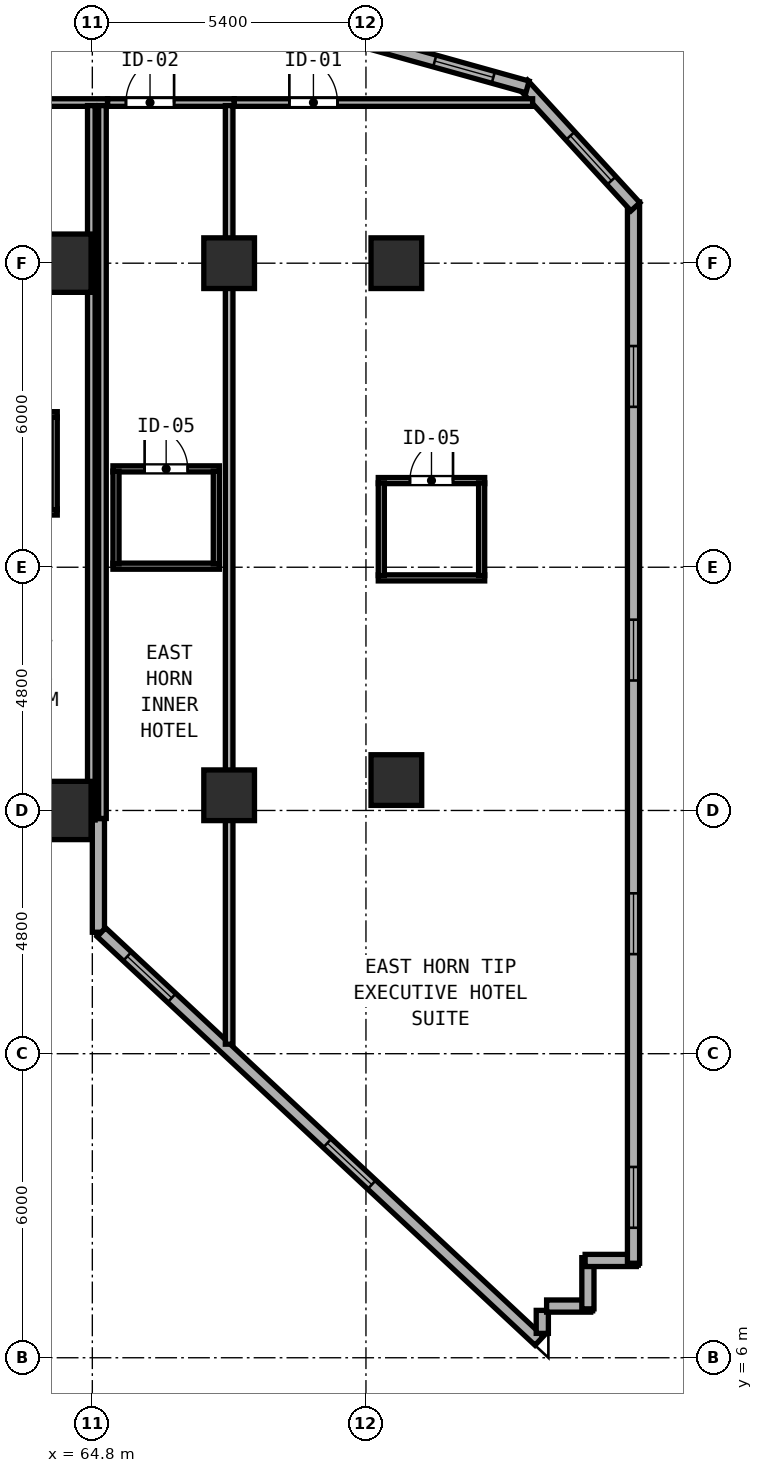
"""IFC4 building model, lengths in metres.
Left out: names, types, materials, properties, quantities, classifications, styles, units other than length and angle.
Written with IfcOpenShell. Run it as: python <this file> out.ifc"""

import sys

from ifc_helpers import new_model, si_unit, direction, frame, frame_2d, origin, origin_2d, place, context, subcontext, project, spatial, rectangle, hollow_rectangle, extrude, element, fill, save


model = new_model("IFC4")
c1 = context("Model", 3, precision=1e-05, world=origin(), true_north=direction((0.0, 1.0)))
c2 = subcontext(c1, "Body", "Model", "MODEL_VIEW")
j1 = project(units=[si_unit("LENGTHUNIT", "METRE"), si_unit("PLANEANGLEUNIT", "RADIAN")], contexts=[c1])
p1 = place(None, origin())
s1 = spatial("IfcSite", under=j1, at=p1, CompositionType="ELEMENT")
p2 = place(p1, origin())
s2 = spatial("IfcBuilding", under=s1, at=p2, CompositionType="ELEMENT")
p3 = place(p2, frame((0.0, 0.0, 81.8)))
s3 = spatial("IfcBuildingStorey", under=s2, at=p3, CompositionType="ELEMENT", Elevation=81.8)
for number, where, z_axis, x_axis in (
    (1, (64.2, 16.8, 0.0), (0.0, 0.0, 1.0), (1.0, 0.0, 0.0)),
    (2, (64.2, 27.6, 0.0), (0.0, 0.0, 1.0), (1.0, 0.0, 0.0)),
):
    element("IfcColumn", number, at=place(p3, frame(where, z_axis=z_axis, x_axis=x_axis)), inside=s3, PredefinedType="COLUMN", context=c2, shape_type="SweptSolid", body=[
        extrude(hollow_rectangle(XDim=1.15, YDim=1.15, WallThickness=0.042, at=origin_2d()), origin(), (0.0, 0.0, 1.0), 3.8),
    ])
for number, where, z_axis, x_axis in (
    (3, (70.8, 17.4, 0.0), (0.0, 0.0, 1.0), (1.0, 0.0, 0.0)),
    (4, (70.8, 27.6, 0.0), (0.0, 0.0, 1.0), (1.0, 0.0, 0.0)),
    (5, (67.5, 17.1, 0.0), (0.0, 0.0, 1.0), (1.0, 0.0, 0.0)),
    (6, (67.5, 27.6, 0.0), (0.0, 0.0, 1.0), (1.0, 0.0, 0.0)),
):
    element("IfcColumn", number, at=place(p3, frame(where, z_axis=z_axis, x_axis=x_axis)), inside=s3, PredefinedType="COLUMN", context=c2, shape_type="SweptSolid", body=[
        extrude(hollow_rectangle(XDim=1.0, YDim=1.0, WallThickness=0.038, at=origin_2d()), origin(), (0.0, 0.0, 1.0), 3.8),
    ])
p4 = place(p3, frame((64.92, 16.64, 0.0), z_axis=(0.0, 0.0, 1.0), x_axis=(0.0, -1.0, 0.0)))
e7 = element("IfcWall", 7, at=p4, inside=s3, PredefinedType="SOLIDWALL", context=c2, shape_type="SweptSolid", body=[
    extrude(rectangle(XDim=2.243, YDim=0.24, at=frame_2d((1.121, 0.0))), origin(), (0.0, 0.0, 1.0), 3.6),
])
p5 = place(p3, frame((64.979, 14.397, 0.0), z_axis=(0.0, 0.0, 1.0), x_axis=(0.731053894258, -0.682319722484, 0.0)))
e8 = element("IfcWall", 8, at=p5, inside=s3, PredefinedType="SOLIDWALL", context=c2, shape_type="SweptSolid", body=[
    extrude(rectangle(XDim=11.818, YDim=0.24, at=frame_2d((5.909, 0.0))), origin(), (0.0, 0.0, 1.0), 3.6),
])
p6 = place(p5, frame((0.7, 0.0, 0.85)))
e9 = element("IfcOpeningElement", 9, at=p6, cuts=e8, PredefinedType="OPENING", context=c2, shape_type="SweptSolid", body=[
    extrude(rectangle(XDim=1.2, YDim=1.85, at=frame_2d((0.6, 0.925))), frame((0.0, 0.13, 0.0), z_axis=(0.0, -1.0, 0.0), x_axis=(1.0, 0.0, 0.0)), (0.0, 0.0, 1.0), 0.26),
])
p7 = place(p5, frame((6.1, 0.0, 0.85)))
e10 = element("IfcOpeningElement", 10, at=p7, cuts=e8, PredefinedType="OPENING", context=c2, shape_type="SweptSolid", body=[
    extrude(rectangle(XDim=1.2, YDim=1.85, at=frame_2d((0.6, 0.925))), frame((0.0, 0.13, 0.0), z_axis=(0.0, -1.0, 0.0), x_axis=(1.0, 0.0, 0.0)), (0.0, 0.0, 1.0), 0.26),
])
p8 = place(p3, frame((73.68, 6.481, 0.0), z_axis=(0.0, 0.0, 1.0), x_axis=(0.0, 1.0, 0.0)))
e11 = element("IfcWall", 11, at=p8, inside=s3, PredefinedType="SOLIDWALL", context=c2, shape_type="SweptSolid", body=[
    extrude(rectangle(XDim=0.454, YDim=0.24, at=frame_2d((0.227, 0.0))), origin(), (0.0, 0.0, 1.0), 3.6),
])
p9 = place(p3, frame((73.765, 7.02, 0.0), z_axis=(0.0, 0.0, 1.0), x_axis=(1.0, 0.0, 0.0)))
e12 = element("IfcWall", 12, at=p9, inside=s3, PredefinedType="SOLIDWALL", context=c2, shape_type="SweptSolid", body=[
    extrude(rectangle(XDim=0.87, YDim=0.24, at=frame_2d((0.435, 0.0))), origin(), (0.0, 0.0, 1.0), 3.6),
])
for number, where, z_axis, x_axis in (
    (13, (74.58, 6.965, 0.0), (0.0, 0.0, 1.0), (0.0, 1.0, 0.0)),
    (14, (74.525, 7.92, 0.0), (0.0, 0.0, 1.0), (1.0, 0.0, 0.0)),
):
    element("IfcWall", number, at=place(p3, frame(where, z_axis=z_axis, x_axis=x_axis)), inside=s3, PredefinedType="SOLIDWALL", context=c2, shape_type="SweptSolid", body=[
        extrude(rectangle(XDim=1.01, YDim=0.24, at=frame_2d((0.505, 0.0))), origin(), (0.0, 0.0, 1.0), 3.6),
    ])
p10 = place(p3, frame((75.48, 7.865, 0.0), z_axis=(0.0, 0.0, 1.0), x_axis=(0.0, 1.0, 0.0)))
e15 = element("IfcWall", 15, at=p10, inside=s3, PredefinedType="SOLIDWALL", context=c2, shape_type="SweptSolid", body=[
    extrude(rectangle(XDim=20.943, YDim=0.24, at=frame_2d((10.472, 0.0))), origin(), (0.0, 0.0, 1.0), 3.6),
])
p11 = place(p10, frame((0.7, 0.0, 0.85)))
e16 = element("IfcOpeningElement", 16, at=p11, cuts=e15, PredefinedType="OPENING", context=c2, shape_type="SweptSolid", body=[
    extrude(rectangle(XDim=1.2, YDim=1.85, at=frame_2d((0.6, 0.925))), frame((0.0, 0.13, 0.0), z_axis=(0.0, -1.0, 0.0), x_axis=(1.0, 0.0, 0.0)), (0.0, 0.0, 1.0), 0.26),
])
p12 = place(p10, frame((6.1, 0.0, 0.85)))
e17 = element("IfcOpeningElement", 17, at=p12, cuts=e15, PredefinedType="OPENING", context=c2, shape_type="SweptSolid", body=[
    extrude(rectangle(XDim=1.2, YDim=1.85, at=frame_2d((0.6, 0.925))), frame((0.0, 0.13, 0.0), z_axis=(0.0, -1.0, 0.0), x_axis=(1.0, 0.0, 0.0)), (0.0, 0.0, 1.0), 0.26),
])
p13 = place(p10, frame((11.5, 0.0, 0.85)))
e18 = element("IfcOpeningElement", 18, at=p13, cuts=e15, PredefinedType="OPENING", context=c2, shape_type="SweptSolid", body=[
    extrude(rectangle(XDim=1.2, YDim=1.85, at=frame_2d((0.6, 0.925))), frame((0.0, 0.13, 0.0), z_axis=(0.0, -1.0, 0.0), x_axis=(1.0, 0.0, 0.0)), (0.0, 0.0, 1.0), 0.26),
])
p14 = place(p10, frame((16.9, 0.0, 0.85)))
e19 = element("IfcOpeningElement", 19, at=p14, cuts=e15, PredefinedType="OPENING", context=c2, shape_type="SweptSolid", body=[
    extrude(rectangle(XDim=1.2, YDim=1.85, at=frame_2d((0.6, 0.925))), frame((0.0, 0.13, 0.0), z_axis=(0.0, -1.0, 0.0), x_axis=(1.0, 0.0, 0.0)), (0.0, 0.0, 1.0), 0.26),
])
p15 = place(p3, frame((75.517, 28.713, 0.0), z_axis=(0.0, 0.0, 1.0), x_axis=(-0.67574145796, 0.737138712858, 0.0)))
e20 = element("IfcWall", 20, at=p15, inside=s3, PredefinedType="SOLIDWALL", context=c2, shape_type="SweptSolid", body=[
    extrude(rectangle(XDim=3.284, YDim=0.24, at=frame_2d((1.642, 0.0))), origin(), (0.0, 0.0, 1.0), 3.6),
])
p16 = place(p15, frame((0.7, 0.0, 0.85)))
e21 = element("IfcOpeningElement", 21, at=p16, cuts=e20, PredefinedType="OPENING", context=c2, shape_type="SweptSolid", body=[
    extrude(rectangle(XDim=1.2, YDim=1.85, at=frame_2d((0.6, 0.925))), frame((0.0, 0.13, 0.0), z_axis=(0.0, -1.0, 0.0), x_axis=(1.0, 0.0, 0.0)), (0.0, 0.0, 1.0), 0.26),
])
p17 = place(p3, frame((73.388, 31.079, 0.0), z_axis=(0.0, 0.0, 1.0), x_axis=(-0.963197271032, 0.268795493036, 0.0)))
e22 = element("IfcWall", 22, at=p17, inside=s3, PredefinedType="SOLIDWALL", context=c2, shape_type="SweptSolid", body=[
    extrude(rectangle(XDim=9.095, YDim=0.24, at=frame_2d((4.548, 0.0))), origin(), (0.0, 0.0, 1.0), 3.6),
])
p18 = place(p17, frame((0.7, 0.0, 0.85)))
e23 = element("IfcOpeningElement", 23, at=p18, cuts=e22, PredefinedType="OPENING", context=c2, shape_type="SweptSolid", body=[
    extrude(rectangle(XDim=1.2, YDim=1.85, at=frame_2d((0.6, 0.925))), frame((0.0, 0.13, 0.0), z_axis=(0.0, -1.0, 0.0), x_axis=(1.0, 0.0, 0.0)), (0.0, 0.0, 1.0), 0.26),
])
p19 = place(p17, frame((6.1, 0.0, 0.85)))
e24 = element("IfcOpeningElement", 24, at=p19, cuts=e22, PredefinedType="OPENING", context=c2, shape_type="SweptSolid", body=[
    extrude(rectangle(XDim=1.2, YDim=1.85, at=frame_2d((0.6, 0.925))), frame((0.0, 0.13, 0.0), z_axis=(0.0, -1.0, 0.0), x_axis=(1.0, 0.0, 0.0)), (0.0, 0.0, 1.0), 0.26),
])
p20 = place(p3, frame((61.202, 30.77, 0.0), z_axis=(0.0, 0.0, 1.0), x_axis=(1.0, 0.0, 0.0)))
e25 = element("IfcWall", 25, at=p20, inside=s3, PredefinedType="PARTITIONING", context=c2, shape_type="SweptSolid", body=[
    extrude(rectangle(XDim=3.898, YDim=0.15, at=frame_2d((1.949, 0.0))), origin(), (0.0, 0.0, 1.0), 3.6),
])
p21 = place(p20, frame((1.09, 0.0, 0.0), z_axis=(0.0, 0.0, 1.0), x_axis=(-1.0, 0.0, 0.0)))
e26 = element("IfcOpeningElement", 26, at=p21, cuts=e25, PredefinedType="OPENING", context=c2, shape_type="SweptSolid", body=[
    extrude(rectangle(XDim=0.95, YDim=2.15, at=frame_2d((0.475, 1.075))), frame((0.0, 0.085, 0.0), z_axis=(0.0, -1.0, 0.0), x_axis=(1.0, 0.0, 0.0)), (0.0, 0.0, 1.0), 0.17),
])
p22 = place(p3, frame((65.0, 16.642, 0.0), z_axis=(0.0, 0.0, 1.0), x_axis=(0.0, 1.0, 0.0)))
e27 = element("IfcWall", 27, at=p22, inside=s3, PredefinedType="PARTITIONING", context=c2, shape_type="SweptSolid", body=[
    extrude(rectangle(XDim=14.068, YDim=0.15, at=frame_2d((7.034, 0.0))), origin(), (0.0, 0.0, 1.0), 3.6),
])
p23 = place(p3, frame((62.008, 24.61, 0.0), z_axis=(0.0, 0.0, 1.0), x_axis=(1.0, 0.0, 0.0)))
e28 = element("IfcWall", 28, at=p23, inside=s3, PredefinedType="PARTITIONING", context=c2, shape_type="SweptSolid", body=[
    extrude(rectangle(XDim=2.1, YDim=0.12, at=frame_2d((1.05, 0.0))), origin(), (0.0, 0.0, 1.0), 3.6),
])
p24 = place(p23, frame((1.475, 0.0, 0.0), z_axis=(0.0, 0.0, 1.0), x_axis=(-1.0, 0.0, 0.0)))
e29 = element("IfcOpeningElement", 29, at=p24, cuts=e28, PredefinedType="OPENING", context=c2, shape_type="SweptSolid", body=[
    extrude(rectangle(XDim=0.85, YDim=2.1, at=frame_2d((0.425, 1.05))), frame((0.0, 0.07, 0.0), z_axis=(0.0, -1.0, 0.0), x_axis=(1.0, 0.0, 0.0)), (0.0, 0.0, 1.0), 0.14),
])
p25 = place(p3, frame((62.008, 22.69, 0.0), z_axis=(0.0, 0.0, 1.0), x_axis=(1.0, 0.0, 0.0)))
e30 = element("IfcWall", 30, at=p25, inside=s3, PredefinedType="PARTITIONING", context=c2, shape_type="SweptSolid", body=[
    extrude(rectangle(XDim=2.1, YDim=0.12, at=frame_2d((1.05, 0.0))), origin(), (0.0, 0.0, 1.0), 3.6),
])
p26 = place(p3, frame((64.048, 22.735, 0.0), z_axis=(0.0, 0.0, 1.0), x_axis=(0.0, 1.0, 0.0)))
e31 = element("IfcWall", 31, at=p26, inside=s3, PredefinedType="PARTITIONING", context=c2, shape_type="SweptSolid", body=[
    extrude(rectangle(XDim=1.83, YDim=0.12, at=frame_2d((0.915, 0.0))), origin(), (0.0, 0.0, 1.0), 3.097),
])
p27 = place(p3, frame((65.102, 30.77, 0.0), z_axis=(0.0, 0.0, 1.0), x_axis=(1.0, 0.0, 0.0)))
e32 = element("IfcWall", 32, at=p27, inside=s3, PredefinedType="PARTITIONING", context=c2, shape_type="SweptSolid", body=[
    extrude(rectangle(XDim=2.498, YDim=0.15, at=frame_2d((1.249, 0.0))), origin(), (0.0, 0.0, 1.0), 3.6),
])
p28 = place(p27, frame((1.312, 0.0, 0.0), z_axis=(0.0, 0.0, 1.0), x_axis=(-1.0, 0.0, 0.0)))
e33 = element("IfcOpeningElement", 33, at=p28, cuts=e32, PredefinedType="OPENING", context=c2, shape_type="SweptSolid", body=[
    extrude(rectangle(XDim=0.95, YDim=2.15, at=frame_2d((0.475, 1.075))), frame((0.0, 0.085, 0.0), z_axis=(0.0, -1.0, 0.0), x_axis=(1.0, 0.0, 0.0)), (0.0, 0.0, 1.0), 0.17),
])
p29 = place(p3, frame((67.5, 12.188, 0.0), z_axis=(0.0, 0.0, 1.0), x_axis=(0.0, 1.0, 0.0)))
e34 = element("IfcWall", 34, at=p29, inside=s3, PredefinedType="PARTITIONING", context=c2, shape_type="SweptSolid", body=[
    extrude(rectangle(XDim=18.522, YDim=0.15, at=frame_2d((9.261, 0.0))), origin(), (0.0, 0.0, 1.0), 3.6),
])
p30 = place(p3, frame((64.78, 16.612, 0.0), z_axis=(0.0, 0.0, 1.0), x_axis=(0.0, 1.0, 0.0)))
e35 = element("IfcWall", 35, at=p30, inside=s3, PredefinedType="PARTITIONING", context=c2, shape_type="SweptSolid", body=[
    extrude(rectangle(XDim=14.098, YDim=0.15, at=frame_2d((7.049, 0.0))), origin(), (0.0, 0.0, 1.0), 3.6),
])
p31 = place(p3, frame((65.207, 23.541, 0.0), z_axis=(0.0, 0.0, 1.0), x_axis=(1.0, 0.0, 0.0)))
e36 = element("IfcWall", 36, at=p31, inside=s3, PredefinedType="PARTITIONING", context=c2, shape_type="SweptSolid", body=[
    extrude(rectangle(XDim=2.1, YDim=0.12, at=frame_2d((1.05, 0.0))), origin(), (0.0, 0.0, 1.0), 3.6),
])
p32 = place(p31, frame((1.475, 0.0, 0.0), z_axis=(0.0, 0.0, 1.0), x_axis=(-1.0, 0.0, 0.0)))
e37 = element("IfcOpeningElement", 37, at=p32, cuts=e36, PredefinedType="OPENING", context=c2, shape_type="SweptSolid", body=[
    extrude(rectangle(XDim=0.85, YDim=2.1, at=frame_2d((0.425, 1.05))), frame((0.0, 0.07, 0.0), z_axis=(0.0, -1.0, 0.0), x_axis=(1.0, 0.0, 0.0)), (0.0, 0.0, 1.0), 0.14),
])
p33 = place(p3, frame((65.207, 21.621, 0.0), z_axis=(0.0, 0.0, 1.0), x_axis=(1.0, 0.0, 0.0)))
e38 = element("IfcWall", 38, at=p33, inside=s3, PredefinedType="PARTITIONING", context=c2, shape_type="SweptSolid", body=[
    extrude(rectangle(XDim=2.1, YDim=0.12, at=frame_2d((1.05, 0.0))), origin(), (0.0, 0.0, 1.0), 3.6),
])
for number, where, z_axis, x_axis in (
    (39, (65.267, 21.666, 0.0), (0.0, 0.0, 1.0), (0.0, 1.0, 0.0)),
    (40, (67.247, 21.666, 0.0), (0.0, 0.0, 1.0), (0.0, 1.0, 0.0)),
):
    element("IfcWall", number, at=place(p3, frame(where, z_axis=z_axis, x_axis=x_axis)), inside=s3, PredefinedType="PARTITIONING", context=c2, shape_type="SweptSolid", body=[
        extrude(rectangle(XDim=1.83, YDim=0.12, at=frame_2d((0.915, 0.0))), origin(), (0.0, 0.0, 1.0), 3.6),
    ])
p34 = place(p3, frame((67.602, 30.77, 0.0), z_axis=(0.0, 0.0, 1.0), x_axis=(1.0, 0.0, 0.0)))
e41 = element("IfcWall", 41, at=p34, inside=s3, PredefinedType="PARTITIONING", context=c2, shape_type="SweptSolid", body=[
    extrude(rectangle(XDim=5.887, YDim=0.15, at=frame_2d((2.943, 0.0))), origin(), (0.0, 0.0, 1.0), 3.6),
])
p35 = place(p34, frame((2.036, 0.0, 0.0), z_axis=(0.0, 0.0, 1.0), x_axis=(-1.0, 0.0, 0.0)))
e42 = element("IfcOpeningElement", 42, at=p35, cuts=e41, PredefinedType="OPENING", context=c2, shape_type="SweptSolid", body=[
    extrude(rectangle(XDim=0.95, YDim=2.18, at=frame_2d((0.475, 1.09))), frame((0.0, 0.085, 0.0), z_axis=(0.0, -1.0, 0.0), x_axis=(1.0, 0.0, 0.0)), (0.0, 0.0, 1.0), 0.17),
])
p36 = place(p3, frame((70.443, 23.31, 0.0), z_axis=(0.0, 0.0, 1.0), x_axis=(1.0, 0.0, 0.0)))
e43 = element("IfcWall", 43, at=p36, inside=s3, PredefinedType="PARTITIONING", context=c2, shape_type="SweptSolid", body=[
    extrude(rectangle(XDim=2.1, YDim=0.12, at=frame_2d((1.05, 0.0))), origin(), (0.0, 0.0, 1.0), 3.6),
])
p37 = place(p36, frame((1.475, 0.0, 0.0), z_axis=(0.0, 0.0, 1.0), x_axis=(-1.0, 0.0, 0.0)))
e44 = element("IfcOpeningElement", 44, at=p37, cuts=e43, PredefinedType="OPENING", context=c2, shape_type="SweptSolid", body=[
    extrude(rectangle(XDim=0.85, YDim=2.1, at=frame_2d((0.425, 1.05))), frame((0.0, 0.07, 0.0), z_axis=(0.0, -1.0, 0.0), x_axis=(1.0, 0.0, 0.0)), (0.0, 0.0, 1.0), 0.14),
])
p38 = place(p3, frame((70.443, 21.39, 0.0), z_axis=(0.0, 0.0, 1.0), x_axis=(1.0, 0.0, 0.0)))
e45 = element("IfcWall", 45, at=p38, inside=s3, PredefinedType="PARTITIONING", context=c2, shape_type="SweptSolid", body=[
    extrude(rectangle(XDim=2.1, YDim=0.12, at=frame_2d((1.05, 0.0))), origin(), (0.0, 0.0, 1.0), 3.6),
])
for number, where, z_axis, x_axis in (
    (46, (70.503, 21.435, 0.0), (0.0, 0.0, 1.0), (0.0, 1.0, 0.0)),
    (47, (72.483, 21.435, 0.0), (0.0, 0.0, 1.0), (0.0, 1.0, 0.0)),
):
    element("IfcWall", number, at=place(p3, frame(where, z_axis=z_axis, x_axis=x_axis)), inside=s3, PredefinedType="PARTITIONING", context=c2, shape_type="SweptSolid", body=[
        extrude(rectangle(XDim=1.83, YDim=0.12, at=frame_2d((0.915, 0.0))), origin(), (0.0, 0.0, 1.0), 3.6),
    ])
p39 = place(p6, origin())
e48 = element("IfcWindow", 48, at=p39, inside=s3, PartitioningType="SINGLE_PANEL", PredefinedType="WINDOW", context=c2, shape_type="SweptSolid", body=[
    extrude(rectangle(XDim=1.2, YDim=1.85, at=frame_2d((0.6, 0.925))), frame((0.0, 0.03, 0.0), z_axis=(0.0, -1.0, 0.0), x_axis=(1.0, 0.0, 0.0)), (0.0, 0.0, 1.0), 0.06),
])
fill(e9, e48)
p40 = place(p7, origin())
e49 = element("IfcWindow", 49, at=p40, inside=s3, PartitioningType="SINGLE_PANEL", PredefinedType="WINDOW", context=c2, shape_type="SweptSolid", body=[
    extrude(rectangle(XDim=1.2, YDim=1.85, at=frame_2d((0.6, 0.925))), frame((0.0, 0.03, 0.0), z_axis=(0.0, -1.0, 0.0), x_axis=(1.0, 0.0, 0.0)), (0.0, 0.0, 1.0), 0.06),
])
fill(e10, e49)
p41 = place(p11, origin())
e50 = element("IfcWindow", 50, at=p41, inside=s3, PartitioningType="SINGLE_PANEL", PredefinedType="WINDOW", context=c2, shape_type="SweptSolid", body=[
    extrude(rectangle(XDim=1.2, YDim=1.85, at=frame_2d((0.6, 0.925))), frame((0.0, 0.03, 0.0), z_axis=(0.0, -1.0, 0.0), x_axis=(1.0, 0.0, 0.0)), (0.0, 0.0, 1.0), 0.06),
])
fill(e16, e50)
p42 = place(p12, origin())
e51 = element("IfcWindow", 51, at=p42, inside=s3, PartitioningType="SINGLE_PANEL", PredefinedType="WINDOW", context=c2, shape_type="SweptSolid", body=[
    extrude(rectangle(XDim=1.2, YDim=1.85, at=frame_2d((0.6, 0.925))), frame((0.0, 0.03, 0.0), z_axis=(0.0, -1.0, 0.0), x_axis=(1.0, 0.0, 0.0)), (0.0, 0.0, 1.0), 0.06),
])
fill(e17, e51)
p43 = place(p13, origin())
e52 = element("IfcWindow", 52, at=p43, inside=s3, PartitioningType="SINGLE_PANEL", PredefinedType="WINDOW", context=c2, shape_type="SweptSolid", body=[
    extrude(rectangle(XDim=1.2, YDim=1.85, at=frame_2d((0.6, 0.925))), frame((0.0, 0.03, 0.0), z_axis=(0.0, -1.0, 0.0), x_axis=(1.0, 0.0, 0.0)), (0.0, 0.0, 1.0), 0.06),
])
fill(e18, e52)
p44 = place(p14, origin())
e53 = element("IfcWindow", 53, at=p44, inside=s3, PartitioningType="SINGLE_PANEL", PredefinedType="WINDOW", context=c2, shape_type="SweptSolid", body=[
    extrude(rectangle(XDim=1.2, YDim=1.85, at=frame_2d((0.6, 0.925))), frame((0.0, 0.03, 0.0), z_axis=(0.0, -1.0, 0.0), x_axis=(1.0, 0.0, 0.0)), (0.0, 0.0, 1.0), 0.06),
])
fill(e19, e53)
p45 = place(p16, origin())
e54 = element("IfcWindow", 54, at=p45, inside=s3, PartitioningType="SINGLE_PANEL", PredefinedType="WINDOW", context=c2, shape_type="SweptSolid", body=[
    extrude(rectangle(XDim=1.2, YDim=1.85, at=frame_2d((0.6, 0.925))), frame((0.0, 0.03, 0.0), z_axis=(0.0, -1.0, 0.0), x_axis=(1.0, 0.0, 0.0)), (0.0, 0.0, 1.0), 0.06),
])
fill(e21, e54)
p46 = place(p18, origin())
e55 = element("IfcWindow", 55, at=p46, inside=s3, PartitioningType="SINGLE_PANEL", PredefinedType="WINDOW", context=c2, shape_type="SweptSolid", body=[
    extrude(rectangle(XDim=1.2, YDim=1.85, at=frame_2d((0.6, 0.925))), frame((0.0, 0.03, 0.0), z_axis=(0.0, -1.0, 0.0), x_axis=(1.0, 0.0, 0.0)), (0.0, 0.0, 1.0), 0.06),
])
fill(e23, e55)
p47 = place(p28, origin())
e56 = element("IfcDoor", 56, at=p47, inside=s3, OperationType="SINGLE_SWING_LEFT", PredefinedType="DOOR", context=c2, shape_type="SweptSolid", body=[
    extrude(rectangle(XDim=0.95, YDim=2.15, at=frame_2d((0.475, 1.075))), frame((0.0, 0.025, 0.0), z_axis=(0.0, -1.0, 0.0), x_axis=(1.0, 0.0, 0.0)), (0.0, 0.0, 1.0), 0.05),
])
fill(e33, e56)
p48 = place(p32, origin())
e57 = element("IfcDoor", 57, at=p48, inside=s3, OperationType="SINGLE_SWING_RIGHT", PredefinedType="DOOR", context=c2, shape_type="SweptSolid", body=[
    extrude(rectangle(XDim=0.85, YDim=2.1, at=frame_2d((0.425, 1.05))), frame((0.0, 0.025, 0.0), z_axis=(0.0, -1.0, 0.0), x_axis=(1.0, 0.0, 0.0)), (0.0, 0.0, 1.0), 0.05),
])
fill(e37, e57)
p49 = place(p35, origin())
e58 = element("IfcDoor", 58, at=p49, inside=s3, OperationType="SINGLE_SWING_RIGHT", PredefinedType="DOOR", context=c2, shape_type="SweptSolid", body=[
    extrude(rectangle(XDim=0.95, YDim=2.18, at=frame_2d((0.475, 1.09))), frame((0.0, 0.025, 0.0), z_axis=(0.0, -1.0, 0.0), x_axis=(1.0, 0.0, 0.0)), (0.0, 0.0, 1.0), 0.05),
])
fill(e42, e58)
p50 = place(p37, origin())
e59 = element("IfcDoor", 59, at=p50, inside=s3, OperationType="SINGLE_SWING_LEFT", PredefinedType="DOOR", context=c2, shape_type="SweptSolid", body=[
    extrude(rectangle(XDim=0.85, YDim=2.1, at=frame_2d((0.425, 1.05))), frame((0.0, 0.025, 0.0), z_axis=(0.0, -1.0, 0.0), x_axis=(1.0, 0.0, 0.0)), (0.0, 0.0, 1.0), 0.05),
])
fill(e44, e59)
save(model, sys.argv[1])
